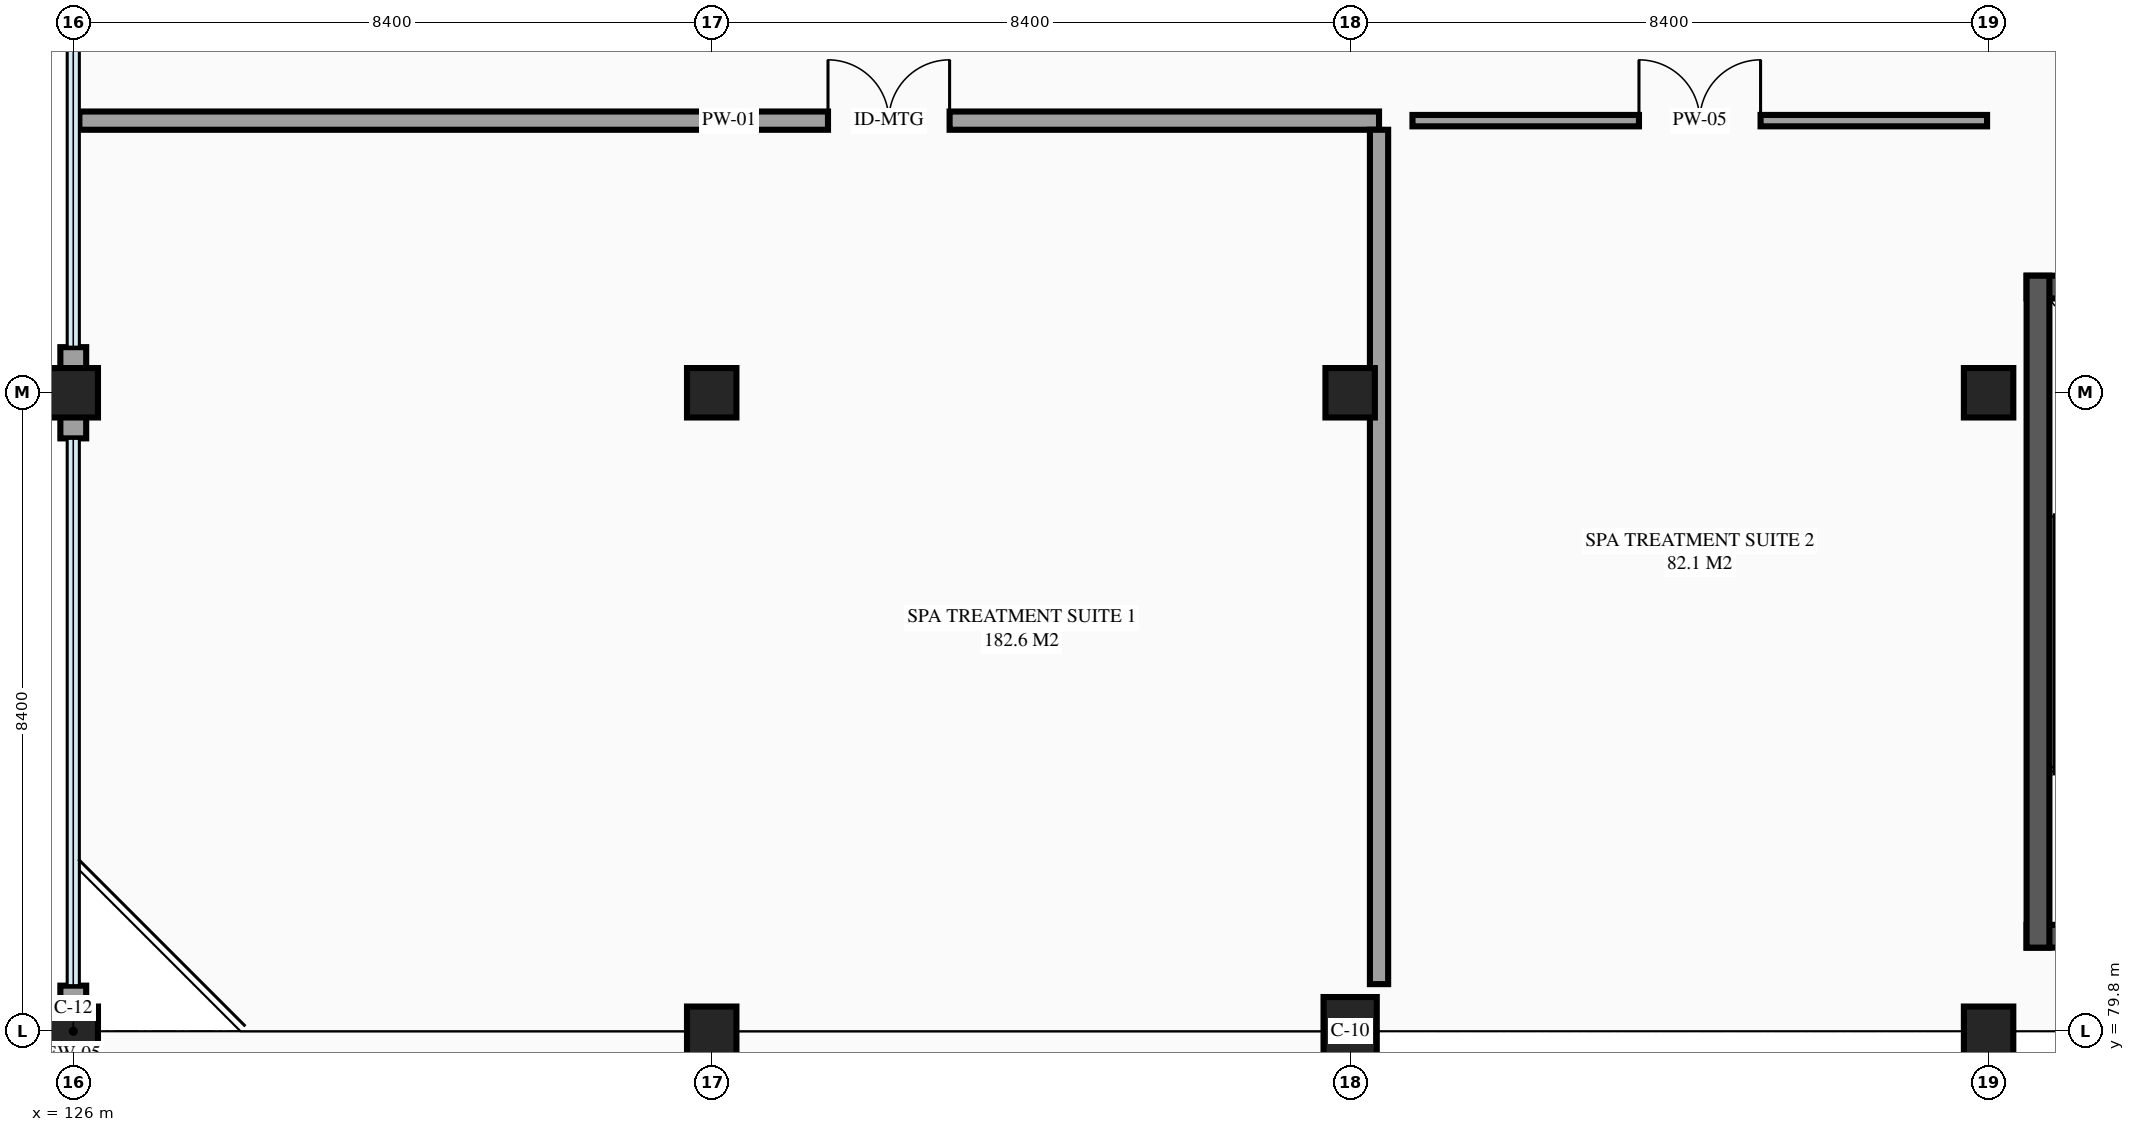
"""IFC4 building model, lengths in metres.
Left out: names, types, materials, properties, quantities, classifications, styles, units other than length and angle.
Written with IfcOpenShell. Run it as: python <this file> out.ifc"""

import sys

from ifc_helpers import new_model, si_unit, direction, frame, frame_2d, origin, origin_2d, place, context, subcontext, project, spatial, rectangle, extrude, element, fill, save


model = new_model("IFC4")
c1 = context("Model", 3, precision=1e-05, world=origin(), true_north=direction((0.0, 1.0)))
c2 = subcontext(c1, "Body", "Model", "MODEL_VIEW")
j1 = project(units=[si_unit("LENGTHUNIT", "METRE"), si_unit("PLANEANGLEUNIT", "RADIAN")], contexts=[c1])
p1 = place(None, origin())
s1 = spatial("IfcSite", under=j1, at=p1, CompositionType="ELEMENT")
p2 = place(p1, origin())
s2 = spatial("IfcBuilding", under=s1, at=p2, CompositionType="ELEMENT")
p3 = place(p2, frame((0.0, 0.0, 5.4)))
s3 = spatial("IfcBuildingStorey", under=s2, at=p3, CompositionType="ELEMENT", Elevation=5.4)
for number, where, z_axis, x_axis in (
    (1, (126.0, 79.8, 0.0), (0.0, 0.0, 1.0), (1.0, 0.0, 0.0)),
    (2, (126.0, 88.2, 0.0), (0.0, 0.0, 1.0), (1.0, 0.0, 0.0)),
    (3, (134.4, 79.8, 0.0), (0.0, 0.0, 1.0), (1.0, 0.0, 0.0)),
    (4, (134.4, 88.2, 0.0), (0.0, 0.0, 1.0), (1.0, 0.0, 0.0)),
):
    element("IfcColumn", number, at=place(p3, frame(where, z_axis=z_axis, x_axis=x_axis)), inside=s3, PredefinedType="COLUMN", context=c2, shape_type="SweptSolid", body=[
        extrude(rectangle(XDim=0.65, YDim=0.65, at=origin_2d()), origin(), (0.0, 0.0, 1.0), 4.5),
    ])
p4 = place(p3, frame((142.8, 79.8, 0.0), z_axis=(0.0, 0.0, 1.0), x_axis=(1.0, 0.0, 0.0)))
e5 = element("IfcColumn", 5, at=p4, inside=s3, PredefinedType="COLUMN", context=c2, shape_type="SweptSolid", body=[
    extrude(rectangle(XDim=0.7, YDim=0.9, at=origin_2d()), origin(), (0.0, 0.0, 1.0), 4.5),
])
for number, where, z_axis, x_axis in (
    (6, (142.8, 88.2, 0.0), (0.0, 0.0, 1.0), (1.0, 0.0, 0.0)),
    (7, (151.2, 79.8, 0.0), (0.0, 0.0, 1.0), (1.0, 0.0, 0.0)),
    (8, (151.2, 88.2, 0.0), (0.0, 0.0, 1.0), (1.0, 0.0, 0.0)),
):
    element("IfcColumn", number, at=place(p3, frame(where, z_axis=z_axis, x_axis=x_axis)), inside=s3, PredefinedType="COLUMN", context=c2, shape_type="SweptSolid", body=[
        extrude(rectangle(XDim=0.65, YDim=0.65, at=origin_2d()), origin(), (0.0, 0.0, 1.0), 4.5),
    ])
p5 = place(p3, frame((126.0, 79.8, 0.0), z_axis=(0.0, 0.0, 1.0), x_axis=(0.0, -1.0, 0.0)))
e9 = element("IfcWall", 9, at=p5, inside=s3, PredefinedType="STANDARD", context=c2, shape_type="SweptSolid", body=[
    extrude(rectangle(XDim=0.6, YDim=0.34, at=frame_2d((0.3, 0.0))), origin(), (0.0, 0.0, 1.0), 4.5),
])
for number, where, z_axis, x_axis in (
    (10, (126.0, 88.2, 0.0), (0.0, 0.0, 1.0), (0.0, -1.0, 0.0)),
    (11, (126.0, 80.4, 0.0), (0.0, 0.0, 1.0), (0.0, -1.0, 0.0)),
):
    element("IfcWall", number, at=place(p3, frame(where, z_axis=z_axis, x_axis=x_axis)), inside=s3, PredefinedType="STANDARD", context=c2, shape_type="SweptSolid", body=[
        extrude(rectangle(XDim=0.6, YDim=0.34, at=frame_2d((0.3, 0.0))), origin(), (0.0, 0.0, 1.0), 4.5),
    ])
p6 = place(p3, frame((126.0, 88.8, 0.0), z_axis=(0.0, 0.0, 1.0), x_axis=(0.0, -1.0, 0.0)))
e12 = element("IfcWall", 12, at=p6, inside=s3, PredefinedType="STANDARD", context=c2, shape_type="SweptSolid", body=[
    extrude(rectangle(XDim=0.6, YDim=0.34, at=frame_2d((0.3, 0.0))), origin(), (0.0, 0.0, 1.0), 4.5),
])
for number, where, z_axis, x_axis in (
    (13, (151.7, 81.05, 0.0), (0.0, 0.0, 1.0), (1.0, 0.0, 0.0)),
    (14, (156.9, 89.59, 0.0), (0.0, 0.0, 1.0), (-1.0, 0.0, 0.0)),
):
    element("IfcWall", number, at=place(p3, frame(where, z_axis=z_axis, x_axis=x_axis)), inside=s3, PredefinedType="SHEAR", context=c2, shape_type="SweptSolid", body=[
        extrude(rectangle(XDim=5.2, YDim=0.3, at=frame_2d((2.6, 0.0))), origin(), (0.0, 0.0, 1.0), 4.5),
    ])
p7 = place(p3, frame((151.85, 89.74, 0.0), z_axis=(0.0, 0.0, 1.0), x_axis=(0.0, -1.0, 0.0)))
e15 = element("IfcWall", 15, at=p7, inside=s3, PredefinedType="SHEAR", context=c2, shape_type="SweptSolid", body=[
    extrude(rectangle(XDim=8.84, YDim=0.3, at=frame_2d((4.42, 0.0))), origin(), (0.0, 0.0, 1.0), 4.5),
])
p8 = place(p3, frame((126.08, 91.78, 0.0), z_axis=(0.0, 0.0, 1.0), x_axis=(1.0, 0.0, 0.0)))
e16 = element("IfcWall", 16, at=p8, inside=s3, PredefinedType="PARTITIONING", context=c2, shape_type="SweptSolid", body=[
    extrude(rectangle(XDim=17.1, YDim=0.24, at=frame_2d((8.55, 0.0))), origin(), (0.0, 0.0, 1.0), 4.235),
])
p9 = place(p8, frame((9.85, 0.0, 0.0)))
e17 = element("IfcOpeningElement", 17, at=p9, cuts=e16, PredefinedType="OPENING", context=c2, shape_type="SweptSolid", body=[
    extrude(rectangle(XDim=1.6, YDim=2.25, at=frame_2d((0.8, 1.125))), frame((0.0, 0.13, 0.0), z_axis=(0.0, -1.0, 0.0), x_axis=(1.0, 0.0, 0.0)), (0.0, 0.0, 1.0), 0.26),
])
p10 = place(p3, frame((143.18, 80.42, 0.0), z_axis=(0.0, 0.0, 1.0), x_axis=(0.0, 1.0, 0.0)))
e18 = element("IfcWall", 18, at=p10, inside=s3, PredefinedType="PARTITIONING", context=c2, shape_type="SweptSolid", body=[
    extrude(rectangle(XDim=11.24, YDim=0.24, at=frame_2d((5.62, 0.0))), origin(), (0.0, 0.0, 1.0), 4.235),
])
p11 = place(p3, frame((143.62, 91.78, 0.0), z_axis=(0.0, 0.0, 1.0), x_axis=(1.0, 0.0, 0.0)))
e19 = element("IfcWall", 19, at=p11, inside=s3, PredefinedType="PARTITIONING", context=c2, shape_type="SweptSolid", body=[
    extrude(rectangle(XDim=7.56, YDim=0.15, at=frame_2d((3.78, 0.0))), origin(), (0.0, 0.0, 1.0), 4.235),
])
p12 = place(p11, frame((2.98, 0.0, 0.0)))
e20 = element("IfcOpeningElement", 20, at=p12, cuts=e19, PredefinedType="OPENING", context=c2, shape_type="SweptSolid", body=[
    extrude(rectangle(XDim=1.6, YDim=2.25, at=frame_2d((0.8, 1.125))), frame((0.0, 0.085, 0.0), z_axis=(0.0, -1.0, 0.0), x_axis=(1.0, 0.0, 0.0)), (0.0, 0.0, 1.0), 0.17),
])
p13 = place(p9, origin())
e21 = element("IfcDoor", 21, at=p13, inside=s3, OperationType="DOUBLE_DOOR_SINGLE_SWING", PredefinedType="DOOR", context=c2, shape_type="SweptSolid", body=[
    extrude(rectangle(XDim=1.6, YDim=2.25, at=frame_2d((0.8, 1.125))), frame((0.0, 0.025, 0.0), z_axis=(0.0, -1.0, 0.0), x_axis=(1.0, 0.0, 0.0)), (0.0, 0.0, 1.0), 0.05),
])
fill(e17, e21)
p14 = place(p12, origin())
e22 = element("IfcDoor", 22, at=p14, inside=s3, OperationType="DOUBLE_DOOR_SINGLE_SWING", PredefinedType="DOOR", context=c2, shape_type="SweptSolid", body=[
    extrude(rectangle(XDim=1.6, YDim=2.25, at=frame_2d((0.8, 1.125))), frame((0.0, 0.025, 0.0), z_axis=(0.0, -1.0, 0.0), x_axis=(1.0, 0.0, 0.0)), (0.0, 0.0, 1.0), 0.05),
])
fill(e20, e22)
save(model, sys.argv[1])
